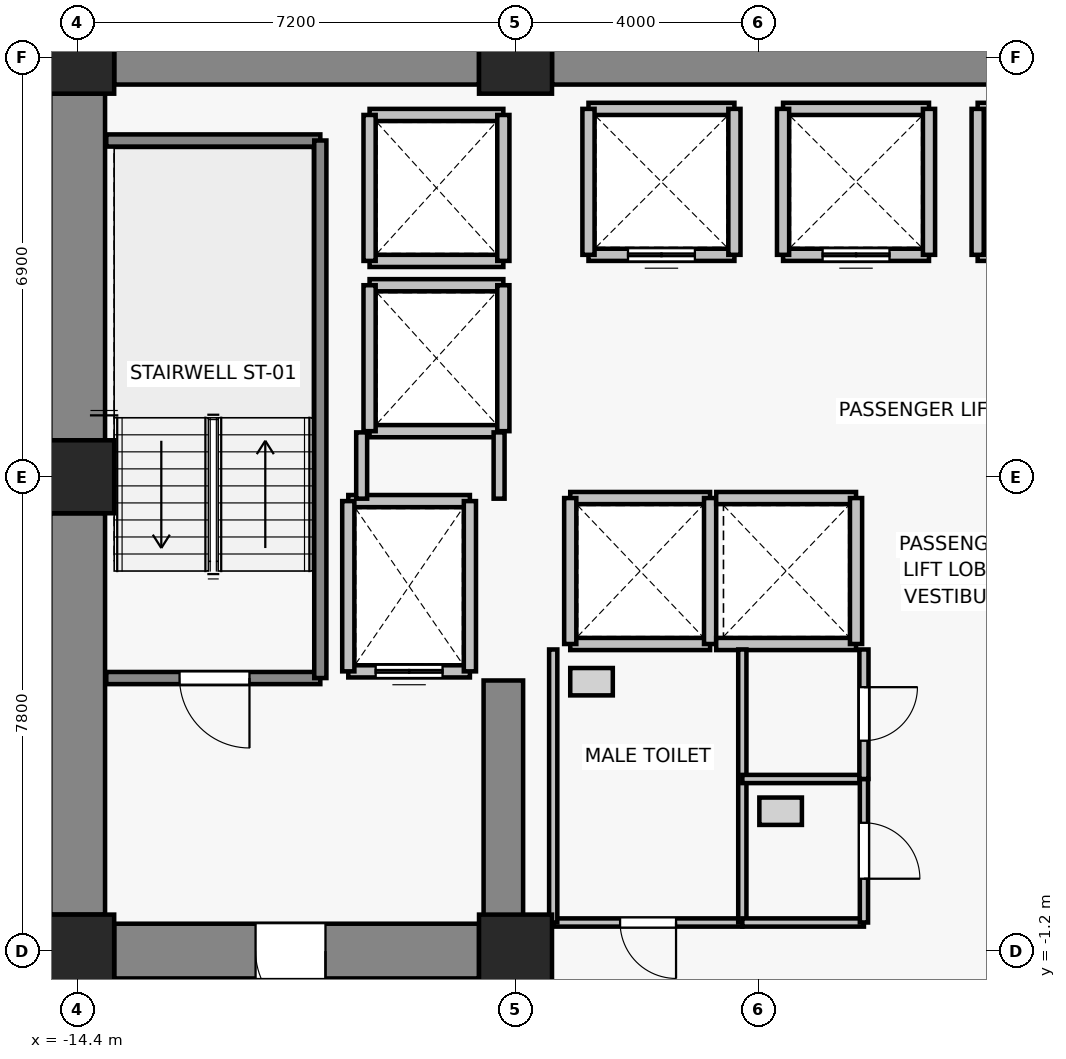
"""IFC4 building model, lengths in metres.
Left out: names, types, materials, properties, quantities, classifications, styles, units other than length and angle.
Written with IfcOpenShell. Run it as: python <this file> out.ifc"""

import sys

from ifc_helpers import new_model, si_unit, direction, frame, frame_2d, origin, origin_2d, place, context, subcontext, project, spatial, rectangle, extrude, source, transform, mapped, element, fill, save


model = new_model("IFC4")
c1 = context("Model", 3, precision=1e-05, world=origin(), true_north=direction((0.0, 1.0)))
c2 = subcontext(c1, "Body", "Model", "MODEL_VIEW")
j1 = project(units=[si_unit("LENGTHUNIT", "METRE"), si_unit("PLANEANGLEUNIT", "RADIAN")], contexts=[c1])
p1 = place(None, origin())
s1 = spatial("IfcSite", under=j1, at=p1, CompositionType="ELEMENT")
p2 = place(p1, origin())
s2 = spatial("IfcBuilding", under=s1, at=p2, CompositionType="ELEMENT")
p3 = place(p2, frame((0.0, 0.0, 63.7)))
s3 = spatial("IfcBuildingStorey", under=s2, at=p3, CompositionType="ELEMENT", Elevation=63.7)
for number, where, z_axis, x_axis in (
    (1, (-14.4, -1.2, 0.0), (0.0, 0.0, 1.0), (1.0, 0.0, 0.0)),
    (2, (-7.2, -1.2, 0.0), (0.0, 0.0, 1.0), (1.0, 0.0, 0.0)),
    (3, (-14.4, 6.6, 0.0), (0.0, 0.0, 1.0), (1.0, 0.0, 0.0)),
    (4, (-14.4, 13.5, 0.0), (0.0, 0.0, 1.0), (1.0, 0.0, 0.0)),
    (5, (-7.2, 13.5, 0.0), (0.0, 0.0, 1.0), (1.0, 0.0, 0.0)),
):
    element("IfcColumn", number, at=place(p3, frame(where, z_axis=z_axis, x_axis=x_axis)), inside=s3, PredefinedType="COLUMN", context=c2, shape_type="SweptSolid", body=[
        extrude(rectangle(XDim=1.2, YDim=1.2, at=origin_2d()), origin(), (0.0, 0.0, 1.0), 3.3),
    ])
p4 = place(p3, frame((-13.8, 13.5, 0.0), z_axis=(0.0, 0.0, 1.0), x_axis=(1.0, 0.0, 0.0)))
e6 = element("IfcWall", 6, at=p4, inside=s3, PredefinedType="SHEAR", context=c2, shape_type="SweptSolid", body=[
    extrude(rectangle(XDim=6.0, YDim=0.9, at=frame_2d((3.0, 0.0))), origin(), (0.0, 0.0, 1.0), 3.075),
])
p5 = place(p3, frame((-6.6, 13.5, 0.0), z_axis=(0.0, 0.0, 1.0), x_axis=(1.0, 0.0, 0.0)))
e7 = element("IfcWall", 7, at=p5, inside=s3, PredefinedType="SHEAR", context=c2, shape_type="SweptSolid", body=[
    extrude(rectangle(XDim=13.2, YDim=0.9, at=frame_2d((6.6, 0.0))), origin(), (0.0, 0.0, 1.0), 3.075),
])
p6 = place(p3, frame((-14.4, -0.6, 0.0), z_axis=(0.0, 0.0, 1.0), x_axis=(0.0, 1.0, 0.0)))
e8 = element("IfcWall", 8, at=p6, inside=s3, PredefinedType="SHEAR", context=c2, shape_type="SweptSolid", body=[
    extrude(rectangle(XDim=6.6, YDim=0.9, at=frame_2d((3.3, 0.0))), origin(), (0.0, 0.0, 1.0), 3.075),
])
p7 = place(p3, frame((-14.4, 7.2, 0.0), z_axis=(0.0, 0.0, 1.0), x_axis=(0.0, 1.0, 0.0)))
e9 = element("IfcWall", 9, at=p7, inside=s3, PredefinedType="SHEAR", context=c2, shape_type="SweptSolid", body=[
    extrude(rectangle(XDim=5.7, YDim=0.9, at=frame_2d((2.85, 0.0))), origin(), (0.0, 0.0, 1.0), 3.075),
])
p8 = place(p3, frame((-7.8, -1.2, 0.0), z_axis=(0.0, 0.0, 1.0), x_axis=(-1.0, 0.0, 0.0)))
e10 = element("IfcWall", 10, at=p8, inside=s3, PredefinedType="SHEAR", context=c2, shape_type="SweptSolid", body=[
    extrude(rectangle(XDim=6.0, YDim=0.9, at=frame_2d((3.0, 0.0))), origin(), (0.0, 0.0, 1.0), 3.075),
])
p9 = place(p8, frame((2.525, 0.0, 0.0)))
e11 = element("IfcOpeningElement", 11, at=p9, cuts=e10, PredefinedType="OPENING", context=c2, shape_type="SweptSolid", body=[
    extrude(rectangle(XDim=1.15, YDim=2.15, at=frame_2d((0.575, 1.075))), frame((0.0, 0.46, 0.0), z_axis=(0.0, -1.0, 0.0), x_axis=(1.0, 0.0, 0.0)), (0.0, 0.0, 1.0), 0.92),
])
p10 = place(p3, frame((-7.4, -0.75, 0.0), z_axis=(0.0, 0.0, 1.0), x_axis=(0.0, 1.0, 0.0)))
e12 = element("IfcWall", 12, at=p10, inside=s3, PredefinedType="SHEAR", context=c2, shape_type="SweptSolid", body=[
    extrude(rectangle(XDim=4.0, YDim=0.65, at=frame_2d((2.0, 0.0))), origin(), (0.0, 0.0, 1.0), 3.075),
])
p11 = place(p3, frame((-7.95, 3.4, 0.0), z_axis=(0.0, 0.0, 1.0), x_axis=(-1.0, 0.0, 0.0)))
e13 = element("IfcWall", 13, at=p11, inside=s3, PredefinedType="SOLIDWALL", context=c2, shape_type="SweptSolid", body=[
    extrude(rectangle(XDim=2.0, YDim=0.2, at=frame_2d((1.0, 0.0))), origin(), (0.0, 0.0, 1.0), 3.075),
])
p12 = place(p11, frame((0.45, 0.0, 0.0)))
e14 = element("IfcOpeningElement", 14, at=p12, cuts=e13, PredefinedType="OPENING", context=c2, shape_type="SweptSolid", body=[
    extrude(rectangle(XDim=1.1, YDim=2.2, at=frame_2d((0.55, 1.1))), frame((0.0, 0.11, 0.0), z_axis=(0.0, -1.0, 0.0), x_axis=(1.0, 0.0, 0.0)), (0.0, 0.0, 1.0), 0.22),
])
p13 = place(p3, frame((-9.95, 6.2, 0.0), z_axis=(0.0, 0.0, 1.0), x_axis=(1.0, 0.0, 0.0)))
e15 = element("IfcWall", 15, at=p13, inside=s3, PredefinedType="SOLIDWALL", context=c2, shape_type="SweptSolid", body=[
    extrude(rectangle(XDim=2.0, YDim=0.2, at=frame_2d((1.0, 0.0))), origin(), (0.0, 0.0, 1.0), 3.075),
])
for number, where, z_axis, x_axis in (
    (16, (-9.95, 3.4, 0.0), (0.0, 0.0, 1.0), (0.0, 1.0, 0.0)),
    (17, (-7.95, 6.2, 0.0), (0.0, 0.0, 1.0), (0.0, -1.0, 0.0)),
):
    element("IfcWall", number, at=place(p3, frame(where, z_axis=z_axis, x_axis=x_axis)), inside=s3, PredefinedType="SOLIDWALL", context=c2, shape_type="SweptSolid", body=[
        extrude(rectangle(XDim=2.8, YDim=0.2, at=frame_2d((1.4, 0.0))), origin(), (0.0, 0.0, 1.0), 3.075),
    ])
p14 = place(p3, frame((-3.6, 10.25, 0.0), z_axis=(0.0, 0.0, 1.0), x_axis=(-1.0, 0.0, 0.0)))
e18 = element("IfcWall", 18, at=p14, inside=s3, PredefinedType="SOLIDWALL", context=c2, shape_type="SweptSolid", body=[
    extrude(rectangle(XDim=2.4, YDim=0.2, at=frame_2d((1.2, 0.0))), origin(), (0.0, 0.0, 1.0), 3.075),
])
p15 = place(p14, frame((0.65, 0.0, 0.0)))
e19 = element("IfcOpeningElement", 19, at=p15, cuts=e18, PredefinedType="OPENING", context=c2, shape_type="SweptSolid", body=[
    extrude(rectangle(XDim=1.1, YDim=2.2, at=frame_2d((0.55, 1.1))), frame((0.0, 0.11, 0.0), z_axis=(0.0, -1.0, 0.0), x_axis=(1.0, 0.0, 0.0)), (0.0, 0.0, 1.0), 0.22),
])
for number, where, z_axis, x_axis in (
    (20, (-6.0, 12.65, 0.0), (0.0, 0.0, 1.0), (1.0, 0.0, 0.0)),
    (21, (-6.0, 10.25, 0.0), (0.0, 0.0, 1.0), (0.0, 1.0, 0.0)),
    (22, (-3.6, 12.65, 0.0), (0.0, 0.0, 1.0), (0.0, -1.0, 0.0)),
):
    element("IfcWall", number, at=place(p3, frame(where, z_axis=z_axis, x_axis=x_axis)), inside=s3, PredefinedType="SOLIDWALL", context=c2, shape_type="SweptSolid", body=[
        extrude(rectangle(XDim=2.4, YDim=0.2, at=frame_2d((1.2, 0.0))), origin(), (0.0, 0.0, 1.0), 3.075),
    ])
p16 = place(p3, frame((-0.4, 10.25, 0.0), z_axis=(0.0, 0.0, 1.0), x_axis=(-1.0, 0.0, 0.0)))
e23 = element("IfcWall", 23, at=p16, inside=s3, PredefinedType="SOLIDWALL", context=c2, shape_type="SweptSolid", body=[
    extrude(rectangle(XDim=2.4, YDim=0.2, at=frame_2d((1.2, 0.0))), origin(), (0.0, 0.0, 1.0), 3.075),
])
p17 = place(p16, frame((0.65, 0.0, 0.0)))
e24 = element("IfcOpeningElement", 24, at=p17, cuts=e23, PredefinedType="OPENING", context=c2, shape_type="SweptSolid", body=[
    extrude(rectangle(XDim=1.1, YDim=2.2, at=frame_2d((0.55, 1.1))), frame((0.0, 0.11, 0.0), z_axis=(0.0, -1.0, 0.0), x_axis=(1.0, 0.0, 0.0)), (0.0, 0.0, 1.0), 0.22),
])
p18 = place(p3, frame((-2.8, 12.65, 0.0), z_axis=(0.0, 0.0, 1.0), x_axis=(1.0, 0.0, 0.0)))
e25 = element("IfcWall", 25, at=p18, inside=s3, PredefinedType="SOLIDWALL", context=c2, shape_type="SweptSolid", body=[
    extrude(rectangle(XDim=2.4, YDim=0.2, at=frame_2d((1.2, 0.0))), origin(), (0.0, 0.0, 1.0), 3.075),
])
for number, where, z_axis, x_axis in (
    (26, (-2.8, 10.25, 0.0), (0.0, 0.0, 1.0), (0.0, 1.0, 0.0)),
    (27, (-0.4, 12.65, 0.0), (0.0, 0.0, 1.0), (0.0, -1.0, 0.0)),
):
    element("IfcWall", number, at=place(p3, frame(where, z_axis=z_axis, x_axis=x_axis)), inside=s3, PredefinedType="SOLIDWALL", context=c2, shape_type="SweptSolid", body=[
        extrude(rectangle(XDim=2.4, YDim=0.2, at=frame_2d((1.2, 0.0))), origin(), (0.0, 0.0, 1.0), 3.075),
    ])
p19 = place(p3, frame((2.8, 10.25, 0.0), z_axis=(0.0, 0.0, 1.0), x_axis=(-1.0, 0.0, 0.0)))
e28 = element("IfcWall", 28, at=p19, inside=s3, PredefinedType="SOLIDWALL", context=c2, shape_type="SweptSolid", body=[
    extrude(rectangle(XDim=2.4, YDim=0.2, at=frame_2d((1.2, 0.0))), origin(), (0.0, 0.0, 1.0), 3.075),
])
p20 = place(p19, frame((0.65, 0.0, 0.0)))
e29 = element("IfcOpeningElement", 29, at=p20, cuts=e28, PredefinedType="OPENING", context=c2, shape_type="SweptSolid", body=[
    extrude(rectangle(XDim=1.1, YDim=2.2, at=frame_2d((0.55, 1.1))), frame((0.0, 0.11, 0.0), z_axis=(0.0, -1.0, 0.0), x_axis=(1.0, 0.0, 0.0)), (0.0, 0.0, 1.0), 0.22),
])
p21 = place(p3, frame((0.4, 12.65, 0.0), z_axis=(0.0, 0.0, 1.0), x_axis=(1.0, 0.0, 0.0)))
e30 = element("IfcWall", 30, at=p21, inside=s3, PredefinedType="SOLIDWALL", context=c2, shape_type="SweptSolid", body=[
    extrude(rectangle(XDim=2.4, YDim=0.2, at=frame_2d((1.2, 0.0))), origin(), (0.0, 0.0, 1.0), 3.075),
])
p22 = place(p3, frame((0.4, 10.25, 0.0), z_axis=(0.0, 0.0, 1.0), x_axis=(0.0, 1.0, 0.0)))
e31 = element("IfcWall", 31, at=p22, inside=s3, PredefinedType="SOLIDWALL", context=c2, shape_type="SweptSolid", body=[
    extrude(rectangle(XDim=2.4, YDim=0.2, at=frame_2d((1.2, 0.0))), origin(), (0.0, 0.0, 1.0), 3.075),
])
for number, where, z_axis, x_axis in (
    (32, (-4.0, 3.85, 0.0), (0.0, 0.0, 1.0), (-1.0, 0.0, 0.0)),
    (33, (-6.3, 6.25, 0.0), (0.0, 0.0, 1.0), (1.0, 0.0, 0.0)),
):
    element("IfcWall", number, at=place(p3, frame(where, z_axis=z_axis, x_axis=x_axis)), inside=s3, PredefinedType="SOLIDWALL", context=c2, shape_type="SweptSolid", body=[
        extrude(rectangle(XDim=2.3, YDim=0.2, at=frame_2d((1.15, 0.0))), origin(), (0.0, 0.0, 1.0), 3.075),
    ])
for number, where, z_axis, x_axis in (
    (34, (-6.3, 3.85, 0.0), (0.0, 0.0, 1.0), (0.0, 1.0, 0.0)),
    (35, (-4.0, 6.25, 0.0), (0.0, 0.0, 1.0), (0.0, -1.0, 0.0)),
):
    element("IfcWall", number, at=place(p3, frame(where, z_axis=z_axis, x_axis=x_axis)), inside=s3, PredefinedType="SOLIDWALL", context=c2, shape_type="SweptSolid", body=[
        extrude(rectangle(XDim=2.4, YDim=0.2, at=frame_2d((1.2, 0.0))), origin(), (0.0, 0.0, 1.0), 3.075),
    ])
for number, where, z_axis, x_axis in (
    (36, (-1.6, 3.85, 0.0), (0.0, 0.0, 1.0), (-1.0, 0.0, 0.0)),
    (37, (-3.9, 6.25, 0.0), (0.0, 0.0, 1.0), (1.0, 0.0, 0.0)),
):
    element("IfcWall", number, at=place(p3, frame(where, z_axis=z_axis, x_axis=x_axis)), inside=s3, PredefinedType="SOLIDWALL", context=c2, shape_type="SweptSolid", body=[
        extrude(rectangle(XDim=2.3, YDim=0.2, at=frame_2d((1.15, 0.0))), origin(), (0.0, 0.0, 1.0), 3.075),
    ])
p23 = place(p3, frame((-1.6, 6.25, 0.0), z_axis=(0.0, 0.0, 1.0), x_axis=(0.0, -1.0, 0.0)))
e38 = element("IfcWall", 38, at=p23, inside=s3, PredefinedType="SOLIDWALL", context=c2, shape_type="SweptSolid", body=[
    extrude(rectangle(XDim=2.4, YDim=0.2, at=frame_2d((1.2, 0.0))), origin(), (0.0, 0.0, 1.0), 3.075),
])
for number, where, z_axis, x_axis in (
    (39, (-7.4, 7.35, 0.0), (0.0, 0.0, 1.0), (-1.0, 0.0, 0.0)),
    (40, (-9.6, 9.75, 0.0), (0.0, 0.0, 1.0), (1.0, 0.0, 0.0)),
):
    element("IfcWall", number, at=place(p3, frame(where, z_axis=z_axis, x_axis=x_axis)), inside=s3, PredefinedType="SOLIDWALL", context=c2, shape_type="SweptSolid", body=[
        extrude(rectangle(XDim=2.2, YDim=0.2, at=frame_2d((1.1, 0.0))), origin(), (0.0, 0.0, 1.0), 2.465),
    ])
p24 = place(p3, frame((-9.6, 7.35, 0.0), z_axis=(0.0, 0.0, 1.0), x_axis=(0.0, 1.0, 0.0)))
e41 = element("IfcWall", 41, at=p24, inside=s3, PredefinedType="SOLIDWALL", context=c2, shape_type="SweptSolid", body=[
    extrude(rectangle(XDim=2.4, YDim=0.2, at=frame_2d((1.2, 0.0))), origin(), (0.0, 0.0, 1.0), 3.075),
])
p25 = place(p3, frame((-7.4, 9.75, 0.0), z_axis=(0.0, 0.0, 1.0), x_axis=(0.0, -1.0, 0.0)))
e42 = element("IfcWall", 42, at=p25, inside=s3, PredefinedType="SOLIDWALL", context=c2, shape_type="SweptSolid", body=[
    extrude(rectangle(XDim=2.4, YDim=0.2, at=frame_2d((1.2, 0.0))), origin(), (0.0, 0.0, 1.0), 2.465),
])
for number, where, z_axis, x_axis in (
    (43, (-7.4, 10.15, 0.0), (0.0, 0.0, 1.0), (-1.0, 0.0, 0.0)),
    (44, (-9.6, 12.55, 0.0), (0.0, 0.0, 1.0), (1.0, 0.0, 0.0)),
):
    element("IfcWall", number, at=place(p3, frame(where, z_axis=z_axis, x_axis=x_axis)), inside=s3, PredefinedType="SOLIDWALL", context=c2, shape_type="SweptSolid", body=[
        extrude(rectangle(XDim=2.2, YDim=0.2, at=frame_2d((1.1, 0.0))), origin(), (0.0, 0.0, 1.0), 2.465),
    ])
p26 = place(p3, frame((-9.6, 10.15, 0.0), z_axis=(0.0, 0.0, 1.0), x_axis=(0.0, 1.0, 0.0)))
e45 = element("IfcWall", 45, at=p26, inside=s3, PredefinedType="SOLIDWALL", context=c2, shape_type="SweptSolid", body=[
    extrude(rectangle(XDim=2.4, YDim=0.2, at=frame_2d((1.2, 0.0))), origin(), (0.0, 0.0, 1.0), 3.075),
])
p27 = place(p3, frame((-7.4, 12.55, 0.0), z_axis=(0.0, 0.0, 1.0), x_axis=(0.0, -1.0, 0.0)))
e46 = element("IfcWall", 46, at=p27, inside=s3, PredefinedType="SOLIDWALL", context=c2, shape_type="SweptSolid", body=[
    extrude(rectangle(XDim=2.4, YDim=0.2, at=frame_2d((1.2, 0.0))), origin(), (0.0, 0.0, 1.0), 2.465),
])
p28 = place(p3, frame((-10.41, 3.29, 0.0), z_axis=(0.0, 0.0, 1.0), x_axis=(-1.0, 0.0, 0.0)))
e47 = element("IfcWall", 47, at=p28, inside=s3, PredefinedType="SOLIDWALL", context=c2, shape_type="SweptSolid", body=[
    extrude(rectangle(XDim=3.52, YDim=0.2, at=frame_2d((1.76, 0.0))), origin(), (0.0, 0.0, 1.0), 3.075),
])
p29 = place(p28, frame((1.165, 0.0, 0.0)))
e48 = element("IfcOpeningElement", 48, at=p29, cuts=e47, PredefinedType="OPENING", context=c2, shape_type="SweptSolid", body=[
    extrude(rectangle(XDim=1.15, YDim=2.15, at=frame_2d((0.575, 1.075))), frame((0.0, 0.11, 0.0), z_axis=(0.0, -1.0, 0.0), x_axis=(1.0, 0.0, 0.0)), (0.0, 0.0, 1.0), 0.22),
])
p30 = place(p3, frame((-13.93, 12.13, 0.0), z_axis=(0.0, 0.0, 1.0), x_axis=(1.0, 0.0, 0.0)))
e49 = element("IfcWall", 49, at=p30, inside=s3, PredefinedType="SOLIDWALL", context=c2, shape_type="SweptSolid", body=[
    extrude(rectangle(XDim=3.52, YDim=0.2, at=frame_2d((1.76, 0.0))), origin(), (0.0, 0.0, 1.0), 3.075),
])
p31 = place(p3, frame((-10.41, 12.13, 0.0), z_axis=(0.0, 0.0, 1.0), x_axis=(0.0, -1.0, 0.0)))
e50 = element("IfcWall", 50, at=p31, inside=s3, PredefinedType="SOLIDWALL", context=c2, shape_type="SweptSolid", body=[
    extrude(rectangle(XDim=8.84, YDim=0.2, at=frame_2d((4.42, 0.0))), origin(), (0.0, 0.0, 1.0), 3.075),
])
p32 = place(p3, frame((-9.73, 6.24, 0.0), z_axis=(0.0, 0.0, 1.0), x_axis=(0.0, 1.0, 0.0)))
e51 = element("IfcWall", 51, at=p32, inside=s3, PredefinedType="PARTITIONING", context=c2, shape_type="SweptSolid", body=[
    extrude(rectangle(XDim=1.09, YDim=0.18, at=frame_2d((0.545, 0.0))), origin(), (0.0, 0.0, 1.0), 3.075),
])
p33 = place(p3, frame((-7.47, 7.33, 0.0), z_axis=(0.0, 0.0, 1.0), x_axis=(0.0, -1.0, 0.0)))
e52 = element("IfcWall", 52, at=p33, inside=s3, PredefinedType="PARTITIONING", context=c2, shape_type="SweptSolid", body=[
    extrude(rectangle(XDim=1.09, YDim=0.18, at=frame_2d((0.545, 0.0))), origin(), (0.0, 0.0, 1.0), 2.465),
])
p34 = place(p3, frame((-3.47, -0.73, 0.0), z_axis=(0.0, 0.0, 1.0), x_axis=(-1.0, 0.0, 0.0)))
e53 = element("IfcWall", 53, at=p34, inside=s3, PredefinedType="PARTITIONING", context=c2, shape_type="SweptSolid", body=[
    extrude(rectangle(XDim=3.11, YDim=0.135, at=frame_2d((1.555, 0.0))), origin(), (0.0, 0.0, 1.0), 3.075),
])
p35 = place(p34, frame((1.09, 0.0, 0.0)))
e54 = element("IfcOpeningElement", 54, at=p35, cuts=e53, PredefinedType="OPENING", context=c2, shape_type="SweptSolid", body=[
    extrude(rectangle(XDim=0.92, YDim=2.1, at=frame_2d((0.46, 1.05))), frame((0.0, 0.077, 0.0), z_axis=(0.0, -1.0, 0.0), x_axis=(1.0, 0.0, 0.0)), (0.0, 0.0, 1.0), 0.155),
])
for number, where, z_axis, x_axis in (
    (55, (-6.58, -0.73, 0.0), (0.0, 0.0, 1.0), (0.0, 1.0, 0.0)),
    (56, (-3.47, 3.76, 0.0), (0.0, 0.0, 1.0), (0.0, -1.0, 0.0)),
):
    element("IfcWall", number, at=place(p3, frame(where, z_axis=z_axis, x_axis=x_axis)), inside=s3, PredefinedType="PARTITIONING", context=c2, shape_type="SweptSolid", body=[
        extrude(rectangle(XDim=4.49, YDim=0.135, at=frame_2d((2.245, 0.0))), origin(), (0.0, 0.0, 1.0), 3.075),
    ])
for number, where, z_axis, x_axis in (
    (57, (-1.47, -0.73, 0.0), (0.0, 0.0, 1.0), (-1.0, 0.0, 0.0)),
    (58, (-3.47, 1.63, 0.0), (0.0, 0.0, 1.0), (1.0, 0.0, 0.0)),
):
    element("IfcWall", number, at=place(p3, frame(where, z_axis=z_axis, x_axis=x_axis)), inside=s3, PredefinedType="PARTITIONING", context=c2, shape_type="SweptSolid", body=[
        extrude(rectangle(XDim=2.0, YDim=0.135, at=frame_2d((1.0, 0.0))), origin(), (0.0, 0.0, 1.0), 3.075),
    ])
p36 = place(p3, frame((-1.47, 1.63, 0.0), z_axis=(0.0, 0.0, 1.0), x_axis=(0.0, -1.0, 0.0)))
e59 = element("IfcWall", 59, at=p36, inside=s3, PredefinedType="PARTITIONING", context=c2, shape_type="SweptSolid", body=[
    extrude(rectangle(XDim=2.36, YDim=0.135, at=frame_2d((1.18, 0.0))), origin(), (0.0, 0.0, 1.0), 3.075),
])
p37 = place(p36, frame((0.72, 0.0, 0.0)))
e60 = element("IfcOpeningElement", 60, at=p37, cuts=e59, PredefinedType="OPENING", context=c2, shape_type="SweptSolid", body=[
    extrude(rectangle(XDim=0.92, YDim=2.1, at=frame_2d((0.46, 1.05))), frame((0.0, 0.077, 0.0), z_axis=(0.0, -1.0, 0.0), x_axis=(1.0, 0.0, 0.0)), (0.0, 0.0, 1.0), 0.155),
])
p38 = place(p3, frame((-1.47, 3.76, 0.0), z_axis=(0.0, 0.0, 1.0), x_axis=(0.0, -1.0, 0.0)))
e61 = element("IfcWall", 61, at=p38, inside=s3, PredefinedType="PARTITIONING", context=c2, shape_type="SweptSolid", body=[
    extrude(rectangle(XDim=2.13, YDim=0.15, at=frame_2d((1.065, 0.0))), origin(), (0.0, 0.0, 1.0), 3.075),
])
p39 = place(p38, frame((0.62, 0.0, 0.0)))
e62 = element("IfcOpeningElement", 62, at=p39, cuts=e61, PredefinedType="OPENING", context=c2, shape_type="SweptSolid", body=[
    extrude(rectangle(XDim=0.88, YDim=2.1, at=frame_2d((0.44, 1.05))), frame((0.0, 0.085, 0.0), z_axis=(0.0, -1.0, 0.0), x_axis=(1.0, 0.0, 0.0)), (0.0, 0.0, 1.0), 0.17),
])
m1 = source(origin(), c2, "Body", "SweptSolid", [
    extrude(rectangle(XDim=1.1, YDim=2.2, at=frame_2d((0.55, 1.1))), frame((0.0, 0.025, 0.0), z_axis=(0.0, -1.0, 0.0), x_axis=(1.0, 0.0, 0.0)), (0.0, 0.0, 1.0), 0.05),
])
p40 = place(p12, origin())
e63 = element("IfcDoor", 63, at=p40, inside=s3, OperationType="DOUBLE_DOOR_SLIDING", PredefinedType="DOOR", context=c2, shape_type="MappedRepresentation", body=[
    mapped(m1, transform((0.0, 0.0, 0.0), x_axis=(1.0, 0.0, 0.0), y_axis=(0.0, 1.0, 0.0), z_axis=(0.0, 0.0, 1.0), scale=1.0)),
])
fill(e14, e63)
p41 = place(p15, origin())
e64 = element("IfcDoor", 64, at=p41, inside=s3, OperationType="DOUBLE_DOOR_SLIDING", PredefinedType="DOOR", context=c2, shape_type="MappedRepresentation", body=[
    mapped(m1, transform((0.0, 0.0, 0.0), x_axis=(1.0, 0.0, 0.0), y_axis=(0.0, 1.0, 0.0), z_axis=(0.0, 0.0, 1.0), scale=1.0)),
])
fill(e19, e64)
p42 = place(p17, origin())
e65 = element("IfcDoor", 65, at=p42, inside=s3, OperationType="DOUBLE_DOOR_SLIDING", PredefinedType="DOOR", context=c2, shape_type="MappedRepresentation", body=[
    mapped(m1, transform((0.0, 0.0, 0.0), x_axis=(1.0, 0.0, 0.0), y_axis=(0.0, 1.0, 0.0), z_axis=(0.0, 0.0, 1.0), scale=1.0)),
])
fill(e24, e65)
m2 = source(origin(), c2, "Body", "SweptSolid", [
    extrude(rectangle(XDim=1.15, YDim=2.15, at=frame_2d((0.575, 1.075))), frame((0.0, 0.025, 0.0), z_axis=(0.0, -1.0, 0.0), x_axis=(1.0, 0.0, 0.0)), (0.0, 0.0, 1.0), 0.05),
])
p43 = place(p29, origin())
e66 = element("IfcDoor", 66, at=p43, inside=s3, OperationType="SINGLE_SWING_LEFT", PredefinedType="DOOR", context=c2, shape_type="MappedRepresentation", body=[
    mapped(m2, transform((0.0, 0.0, 0.0), x_axis=(1.0, 0.0, 0.0), y_axis=(0.0, 1.0, 0.0), z_axis=(0.0, 0.0, 1.0), scale=1.0)),
])
fill(e48, e66)
p44 = place(p9, origin())
e67 = element("IfcDoor", 67, at=p44, inside=s3, OperationType="SINGLE_SWING_LEFT", PredefinedType="DOOR", context=c2, shape_type="MappedRepresentation", body=[
    mapped(m2, transform((0.0, 0.0, 0.0), x_axis=(1.0, 0.0, 0.0), y_axis=(0.0, 1.0, 0.0), z_axis=(0.0, 0.0, 1.0), scale=1.0)),
])
fill(e11, e67)
m3 = source(origin(), c2, "Body", "SweptSolid", [
    extrude(rectangle(XDim=0.92, YDim=2.1, at=frame_2d((0.46, 1.05))), frame((0.0, 0.025, 0.0), z_axis=(0.0, -1.0, 0.0), x_axis=(1.0, 0.0, 0.0)), (0.0, 0.0, 1.0), 0.05),
])
p45 = place(p35, origin())
e68 = element("IfcDoor", 68, at=p45, inside=s3, OperationType="SINGLE_SWING_LEFT", PredefinedType="DOOR", context=c2, shape_type="MappedRepresentation", body=[
    mapped(m3, transform((0.0, 0.0, 0.0), x_axis=(1.0, 0.0, 0.0), y_axis=(0.0, 1.0, 0.0), z_axis=(0.0, 0.0, 1.0), scale=1.0)),
])
fill(e54, e68)
p46 = place(p37, origin())
e69 = element("IfcDoor", 69, at=p46, inside=s3, OperationType="SINGLE_SWING_RIGHT", PredefinedType="DOOR", context=c2, shape_type="MappedRepresentation", body=[
    mapped(m3, transform((0.0, 0.0, 0.0), x_axis=(1.0, 0.0, 0.0), y_axis=(0.0, 1.0, 0.0), z_axis=(0.0, 0.0, 1.0), scale=1.0)),
])
fill(e60, e69)
m4 = source(origin(), c2, "Body", "SweptSolid", [
    extrude(rectangle(XDim=0.88, YDim=2.1, at=frame_2d((0.44, 1.05))), frame((0.0, 0.025, 0.0), z_axis=(0.0, -1.0, 0.0), x_axis=(1.0, 0.0, 0.0)), (0.0, 0.0, 1.0), 0.05),
])
p47 = place(p39, origin())
e70 = element("IfcDoor", 70, at=p47, inside=s3, OperationType="SINGLE_SWING_LEFT", PredefinedType="DOOR", context=c2, shape_type="MappedRepresentation", body=[
    mapped(m4, transform((0.0, 0.0, 0.0), x_axis=(1.0, 0.0, 0.0), y_axis=(0.0, 1.0, 0.0), z_axis=(0.0, 0.0, 1.0), scale=1.0)),
])
fill(e62, e70)
save(model, sys.argv[1])
